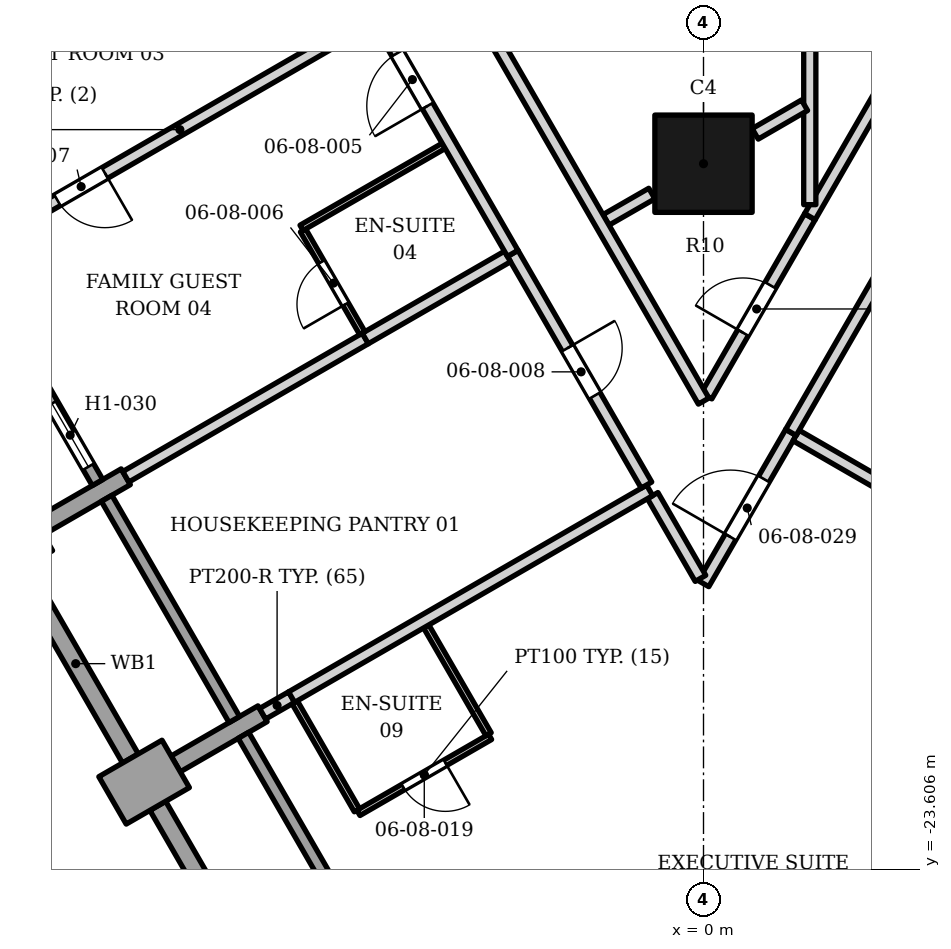
"""IFC4 building model, lengths in metres.
Left out: names, types, materials, properties, quantities, classifications, styles, units other than length and angle.
Written with IfcOpenShell. Run it as: python <this file> out.ifc"""

import sys

from ifc_helpers import new_model, si_unit, direction, frame, frame_2d, origin, origin_2d, place, context, subcontext, project, spatial, rectangle, extrude, element, fill, save


model = new_model("IFC4")
c1 = context("Model", 3, precision=1e-05, world=origin(), true_north=direction((0.0, 1.0)))
c2 = subcontext(c1, "Body", "Model", "MODEL_VIEW")
j1 = project(units=[si_unit("LENGTHUNIT", "METRE"), si_unit("PLANEANGLEUNIT", "RADIAN")], contexts=[c1])
p1 = place(None, origin())
s1 = spatial("IfcSite", under=j1, at=p1, CompositionType="ELEMENT")
p2 = place(p1, origin())
s2 = spatial("IfcBuilding", under=s1, at=p2, CompositionType="ELEMENT")
p3 = place(p2, frame((0.0, 0.0, 46.0)))
s3 = spatial("IfcBuildingStorey", under=s2, at=p3, CompositionType="ELEMENT", Elevation=46.0)
p4 = place(p3, frame((0.0, -12.0, 0.0), z_axis=(0.0, 0.0, 1.0), x_axis=(1.0, 0.0, 0.0)))
e1 = element("IfcColumn", 1, at=p4, inside=s3, PredefinedType="COLUMN", context=c2, shape_type="SweptSolid", body=[
    extrude(rectangle(XDim=1.6, YDim=1.6, at=origin_2d()), origin(), (0.0, 0.0, 1.0), 3.4),
])
p5 = place(p3, frame((-11.45, -18.273, 0.0), z_axis=(0.0, 0.0, 1.0), x_axis=(0.5, -0.866025403784, 0.0)))
e2 = element("IfcColumn", 2, at=p5, inside=s3, PredefinedType="COLUMN", context=c2, shape_type="SweptSolid", body=[
    extrude(rectangle(XDim=0.9, YDim=1.2, at=origin_2d()), origin(), (0.0, 0.0, 1.0), 3.4),
])
p6 = place(p3, frame((-10.93, -17.973, 0.0), z_axis=(0.0, 0.0, 1.0), x_axis=(0.866040211805, 0.499974350878, 0.0)))
e3 = element("IfcWall", 3, at=p6, inside=s3, PredefinedType="SOLIDWALL", context=c2, shape_type="SweptSolid", body=[
    extrude(rectangle(XDim=1.65, YDim=0.3, at=frame_2d((0.825, 0.0))), origin(), (0.0, 0.0, 1.0), 2.65),
])
p7 = place(p3, frame((-8.68, -21.87, 0.0), z_axis=(0.0, 0.0, 1.0), x_axis=(-0.866094119867, -0.499880961361, 0.0)))
e4 = element("IfcWall", 4, at=p7, inside=s3, PredefinedType="SOLIDWALL", context=c2, shape_type="SweptSolid", body=[
    extrude(rectangle(XDim=1.2, YDim=0.9, at=frame_2d((0.6, 0.0))), origin(), (0.0, 0.0, 1.0), 2.63),
])
p8 = place(p3, frame((-8.68, -21.87, 0.0), z_axis=(0.0, 0.0, 1.0), x_axis=(0.865976140824, 0.500085316245, 0.0)))
e5 = element("IfcWall", 5, at=p8, inside=s3, PredefinedType="SOLIDWALL", context=c2, shape_type="SweptSolid", body=[
    extrude(rectangle(XDim=1.65, YDim=0.3, at=frame_2d((0.825, 0.0))), origin(), (0.0, 0.0, 1.0), 2.65),
])
p9 = place(p3, frame((-12.066, -13.606, 0.0), z_axis=(0.0, 0.0, 1.0), x_axis=(0.500027713859, -0.866009402589, 0.0)))
e6 = element("IfcWall", 6, at=p9, inside=s3, PredefinedType="ELEMENTEDWALL", context=c2, shape_type="SweptSolid", body=[
    extrude(rectangle(XDim=4.2, YDim=0.2, at=frame_2d((2.1, 0.0))), origin(), (0.0, 0.0, 1.0), 2.65),
])
p10 = place(p9, frame((0.3, 0.0, 0.6)))
e7 = element("IfcOpeningElement", 7, at=p10, cuts=e6, PredefinedType="OPENING", context=c2, shape_type="SweptSolid", body=[
    extrude(rectangle(XDim=2.1, YDim=1.8, at=frame_2d((1.05, 0.9))), frame((0.0, 0.11, 0.0), z_axis=(0.0, -1.0, 0.0), x_axis=(1.0, 0.0, 0.0)), (0.0, 0.0, 1.0), 0.22),
])
p11 = place(p9, frame((2.7, 0.0, 0.0)))
e8 = element("IfcOpeningElement", 8, at=p11, cuts=e6, PredefinedType="OPENING", context=c2, shape_type="SweptSolid", body=[
    extrude(rectangle(XDim=1.2, YDim=2.4, at=frame_2d((0.6, 1.2))), frame((0.0, 0.11, 0.0), z_axis=(0.0, -1.0, 0.0), x_axis=(1.0, 0.0, 0.0)), (0.0, 0.0, 1.0), 0.22),
])
p12 = place(p3, frame((-11.225, -18.663, 0.0), z_axis=(0.0, 0.0, 1.0), x_axis=(0.500012057535, -0.866018442252, 0.0)))
e9 = element("IfcWall", 9, at=p12, inside=s3, PredefinedType="SOLIDWALL", context=c2, shape_type="SweptSolid", body=[
    extrude(rectangle(XDim=3.6, YDim=0.3, at=frame_2d((1.8, 0.0))), origin(), (0.0, 0.0, 1.0), 2.63),
])
p13 = place(p3, frame((-9.816, -17.503, 0.0), z_axis=(0.0, 0.0, 1.0), x_axis=(0.500002543286, -0.866023935413, 0.0)))
e10 = element("IfcWall", 10, at=p13, inside=s3, PredefinedType="ELEMENTEDWALL", context=c2, shape_type="SweptSolid", body=[
    extrude(rectangle(XDim=4.2, YDim=0.2, at=frame_2d((2.1, 0.0))), origin(), (0.0, 0.0, 1.0), 2.65),
])
p14 = place(p3, frame((-8.975, -22.56, 0.0), z_axis=(0.0, 0.0, 1.0), x_axis=(0.500012057535, -0.866018442252, 0.0)))
e11 = element("IfcWall", 11, at=p14, inside=s3, PredefinedType="SOLIDWALL", context=c2, shape_type="SweptSolid", body=[
    extrude(rectangle(XDim=3.6, YDim=0.3, at=frame_2d((1.8, 0.0))), origin(), (0.0, 0.0, 1.0), 2.63),
])
p15 = place(p3, frame((-7.566, -21.4, 0.0), z_axis=(0.0, 0.0, 1.0), x_axis=(0.500027713859, -0.866009402589, 0.0)))
e12 = element("IfcWall", 12, at=p15, inside=s3, PredefinedType="ELEMENTEDWALL", context=c2, shape_type="SweptSolid", body=[
    extrude(rectangle(XDim=4.2, YDim=0.2, at=frame_2d((2.1, 0.0))), origin(), (0.0, 0.0, 1.0), 2.65),
])
p16 = place(p3, frame((-5.675, -22.676, 0.0), z_axis=(0.0, 0.0, 1.0), x_axis=(0.866022959057, 0.500004234368, 0.0)))
e13 = element("IfcWall", 13, at=p16, inside=s3, PredefinedType="PARTITIONING", context=c2, shape_type="SweptSolid", body=[
    extrude(rectangle(XDim=2.5, YDim=0.1, at=frame_2d((1.25, 0.0))), origin(), (0.0, 0.0, 1.0), 2.552),
])
p17 = place(p16, frame((0.85, 0.0, 0.0)))
e14 = element("IfcOpeningElement", 14, at=p17, cuts=e13, PredefinedType="OPENING", context=c2, shape_type="SweptSolid", body=[
    extrude(rectangle(XDim=0.8, YDim=2.1, at=frame_2d((0.4, 1.05))), frame((0.0, 0.06, 0.0), z_axis=(0.0, -1.0, 0.0), x_axis=(1.0, 0.0, 0.0)), (0.0, 0.0, 1.0), 0.12),
])
p18 = place(p3, frame((-4.561, -19.608, 0.0), z_axis=(0.0, 0.0, 1.0), x_axis=(0.500646589026, -0.865651773461, 0.0)))
e15 = element("IfcWall", 15, at=p18, inside=s3, PredefinedType="PARTITIONING", context=c2, shape_type="SweptSolid", body=[
    extrude(rectangle(XDim=2.05, YDim=0.1, at=frame_2d((1.025, 0.0))), origin(), (0.0, 0.0, 1.0), 2.552),
])
p19 = place(p3, frame((-7.251, -21.046, 0.0), z_axis=(0.0, 0.0, 1.0), x_axis=(0.86747675874, 0.497477711105, 0.0)))
e16 = element("IfcWall", 16, at=p19, inside=s3, PredefinedType="PARTITIONING", context=c2, shape_type="SweptSolid", body=[
    extrude(rectangle(XDim=0.55, YDim=0.2, at=frame_2d((0.275, 0.0))), origin(), (0.0, 0.0, 1.0), 3.23),
])
p20 = place(p3, frame((-6.723, -20.856, 0.0), z_axis=(0.0, 0.0, 1.0), x_axis=(0.499354689006, -0.866397653833, 0.0)))
e17 = element("IfcWall", 17, at=p20, inside=s3, PredefinedType="PARTITIONING", context=c2, shape_type="SweptSolid", body=[
    extrude(rectangle(XDim=2.05, YDim=0.1, at=frame_2d((1.025, 0.0))), origin(), (0.0, 0.0, 1.0), 3.23),
])
p21 = place(p3, frame((0.0, -18.906, 0.0), z_axis=(0.0, 0.0, 1.0), x_axis=(0.50046312627, 0.865757852545, 0.0)))
e18 = element("IfcWall", 18, at=p21, inside=s3, PredefinedType="PARTITIONING", context=c2, shape_type="SweptSolid", body=[
    extrude(rectangle(XDim=2.872, YDim=0.2, at=frame_2d((1.436, 0.0))), origin(), (0.0, 0.0, 1.0), 2.628),
])
p22 = place(p21, frame((0.886, 0.0, 0.0)))
e19 = element("IfcOpeningElement", 19, at=p22, cuts=e18, PredefinedType="OPENING", context=c2, shape_type="SweptSolid", body=[
    extrude(rectangle(XDim=1.1, YDim=2.1, at=frame_2d((0.55, 1.05))), frame((0.0, 0.11, 0.0), z_axis=(0.0, -1.0, 0.0), x_axis=(1.0, 0.0, 0.0)), (0.0, 0.0, 1.0), 0.22),
])
p23 = place(p3, frame((-0.836, -17.458, 0.0), z_axis=(0.0, 0.0, 1.0), x_axis=(0.50013013712, -0.865950256045, 0.0)))
e20 = element("IfcWall", 20, at=p23, inside=s3, PredefinedType="PARTITIONING", context=c2, shape_type="SweptSolid", body=[
    extrude(rectangle(XDim=1.572, YDim=0.2, at=frame_2d((0.786, 0.0))), origin(), (0.0, 0.0, 1.0), 2.628),
])
p24 = place(p3, frame((-6.774, -20.772, 0.0), z_axis=(0.0, 0.0, 1.0), x_axis=(0.866036107898, 0.499981459473, 0.0)))
e21 = element("IfcWall", 21, at=p24, inside=s3, PredefinedType="PARTITIONING", context=c2, shape_type="SweptSolid", body=[
    extrude(rectangle(XDim=6.8, YDim=0.2, at=frame_2d((3.4, 0.0))), origin(), (0.0, 0.0, 1.0), 2.552),
])
p25 = place(p3, frame((-3.137, -13.476, 0.0), z_axis=(0.0, 0.0, 1.0), x_axis=(0.499989943423, -0.866031209874, 0.0)))
e22 = element("IfcWall", 22, at=p25, inside=s3, PredefinedType="PARTITIONING", context=c2, shape_type="SweptSolid", body=[
    extrude(rectangle(XDim=4.398, YDim=0.2, at=frame_2d((2.199, 0.0))), origin(), (0.0, 0.0, 1.0), 3.23),
])
p26 = place(p25, frame((1.798, 0.0, 0.0)))
e23 = element("IfcOpeningElement", 23, at=p26, cuts=e22, PredefinedType="OPENING", context=c2, shape_type="SweptSolid", body=[
    extrude(rectangle(XDim=0.9, YDim=2.1, at=frame_2d((0.45, 1.05))), frame((0.0, 0.11, 0.0), z_axis=(0.0, -1.0, 0.0), x_axis=(1.0, 0.0, 0.0)), (0.0, 0.0, 1.0), 0.22),
])
p27 = place(p3, frame((1.522, -16.469, 0.0), z_axis=(0.0, 0.0, 1.0), x_axis=(0.866125590059, -0.499826432119, 0.0)))
e24 = element("IfcWall", 24, at=p27, inside=s3, PredefinedType="PARTITIONING", context=c2, shape_type="SweptSolid", body=[
    extrude(rectangle(XDim=7.25, YDim=0.2, at=frame_2d((3.625, 0.0))), origin(), (0.0, 0.0, 1.0), 2.552),
])
p28 = place(p3, frame((0.05, -15.818, 0.0), z_axis=(0.0, 0.0, 1.0), x_axis=(0.499521489101, 0.866301495974, 0.0)))
e25 = element("IfcWall", 25, at=p28, inside=s3, PredefinedType="PARTITIONING", context=c2, shape_type="SweptSolid", body=[
    extrude(rectangle(XDim=3.401, YDim=0.2, at=frame_2d((1.7, 0.0))), origin(), (0.0, 0.0, 1.0), 2.628),
])
p29 = place(p28, frame((1.2, 0.0, 0.0)))
e26 = element("IfcOpeningElement", 26, at=p29, cuts=e25, PredefinedType="OPENING", context=c2, shape_type="SweptSolid", body=[
    extrude(rectangle(XDim=0.9, YDim=2.1, at=frame_2d((0.45, 1.05))), frame((0.0, 0.11, 0.0), z_axis=(0.0, -1.0, 0.0), x_axis=(1.0, 0.0, 0.0)), (0.0, 0.0, 1.0), 0.22),
])
p30 = place(p3, frame((-9.501, -17.148, 0.0), z_axis=(0.0, 0.0, 1.0), x_axis=(0.866032838626, 0.499987122256, 0.0)))
e27 = element("IfcWall", 27, at=p30, inside=s3, PredefinedType="PARTITIONING", context=c2, shape_type="SweptSolid", body=[
    extrude(rectangle(XDim=4.551, YDim=0.2, at=frame_2d((2.276, 0.0))), origin(), (0.0, 0.0, 1.0), 2.782),
])
p31 = place(p3, frame((-5.563, -14.874, 0.0), z_axis=(0.0, 0.0, 1.0), x_axis=(0.866384216157, 0.499378003114, 0.0)))
e28 = element("IfcWall", 28, at=p31, inside=s3, PredefinedType="PARTITIONING", context=c2, shape_type="SweptSolid", body=[
    extrude(rectangle(XDim=2.7, YDim=0.2, at=frame_2d((1.35, 0.0))), origin(), (0.0, 0.0, 1.0), 2.552),
])
p32 = place(p3, frame((-6.586, -13.098, 0.0), z_axis=(0.0, 0.0, 1.0), x_axis=(0.49995005938, -0.866054235095, 0.0)))
e29 = element("IfcWall", 29, at=p32, inside=s3, PredefinedType="PARTITIONING", context=c2, shape_type="SweptSolid", body=[
    extrude(rectangle(XDim=1.95, YDim=0.1, at=frame_2d((0.975, 0.0))), origin(), (0.0, 0.0, 1.0), 3.23),
])
p33 = place(p32, frame((0.6, 0.0, 0.0)))
e30 = element("IfcOpeningElement", 30, at=p33, cuts=e29, PredefinedType="OPENING", context=c2, shape_type="SweptSolid", body=[
    extrude(rectangle(XDim=0.8, YDim=2.1, at=frame_2d((0.4, 1.05))), frame((0.0, 0.06, 0.0), z_axis=(0.0, -1.0, 0.0), x_axis=(1.0, 0.0, 0.0)), (0.0, 0.0, 1.0), 0.12),
])
p34 = place(p3, frame((-1.604, -12.924, 0.0), z_axis=(0.0, 0.0, 1.0), x_axis=(0.866960927484, 0.498376113207, 0.0)))
e31 = element("IfcWall", 31, at=p34, inside=s3, PredefinedType="PARTITIONING", context=c2, shape_type="SweptSolid", body=[
    extrude(rectangle(XDim=0.869, YDim=0.2, at=frame_2d((0.435, 0.0))), origin(), (0.0, 0.0, 1.0), 3.23),
])
p35 = place(p3, frame((1.75, -12.87, 0.0), z_axis=(0.0, 0.0, 1.0), x_axis=(0.499999309361, 0.866025802525, 0.0)))
e32 = element("IfcWall", 32, at=p35, inside=s3, PredefinedType="PARTITIONING", context=c2, shape_type="SweptSolid", body=[
    extrude(rectangle(XDim=19.134, YDim=0.2, at=frame_2d((9.567, 0.0))), origin(), (0.0, 0.0, 1.0), 2.302),
])
p36 = place(p35, frame((14.098, 0.0, 0.0)))
e33 = element("IfcOpeningElement", 33, at=p36, cuts=e32, PredefinedType="OPENING", context=c2, shape_type="SweptSolid", body=[
    extrude(rectangle(XDim=1.0, YDim=2.1, at=frame_2d((0.5, 1.05))), frame((0.0, 0.11, 0.0), z_axis=(0.0, -1.0, 0.0), x_axis=(1.0, 0.0, 0.0)), (0.0, 0.0, 1.0), 0.22),
])
p37 = place(p35, frame((4.53, 0.0, 0.0)))
e34 = element("IfcOpeningElement", 34, at=p37, cuts=e32, PredefinedType="OPENING", context=c2, shape_type="SweptSolid", body=[
    extrude(rectangle(XDim=1.0, YDim=2.1, at=frame_2d((0.5, 1.05))), frame((0.0, 0.11, 0.0), z_axis=(0.0, -1.0, 0.0), x_axis=(1.0, 0.0, 0.0)), (0.0, 0.0, 1.0), 0.22),
])
p38 = place(p3, frame((1.748, -12.674, 0.0), z_axis=(0.0, 0.0, 1.0), x_axis=(0.0, 1.0, 0.0)))
e35 = element("IfcWall", 35, at=p38, inside=s3, PredefinedType="PARTITIONING", context=c2, shape_type="SweptSolid", body=[
    extrude(rectangle(XDim=8.516, YDim=0.2, at=frame_2d((4.258, 0.0))), origin(), (0.0, 0.0, 1.0), 2.302),
])
p39 = place(p3, frame((-6.611, -13.054, 0.0), z_axis=(0.0, 0.0, 1.0), x_axis=(0.866339109022, 0.499456252518, 0.0)))
e36 = element("IfcWall", 36, at=p39, inside=s3, PredefinedType="PARTITIONING", context=c2, shape_type="SweptSolid", body=[
    extrude(rectangle(XDim=2.7, YDim=0.1, at=frame_2d((1.35, 0.0))), origin(), (0.0, 0.0, 1.0), 2.302),
])
p40 = place(p3, frame((0.85, -11.509, 0.0), z_axis=(0.0, 0.0, 1.0), x_axis=(0.865248014814, 0.501344066345, 0.0)))
e37 = element("IfcWall", 37, at=p40, inside=s3, PredefinedType="PARTITIONING", context=c2, shape_type="SweptSolid", body=[
    extrude(rectangle(XDim=0.938, YDim=0.2, at=frame_2d((0.469, 0.0))), origin(), (0.0, 0.0, 1.0), 3.23),
])
p41 = place(p3, frame((-11.751, -13.251, 0.0), z_axis=(0.0, 0.0, 1.0), x_axis=(0.866134002969, 0.499811853502, 0.0)))
e38 = element("IfcWall", 38, at=p41, inside=s3, PredefinedType="PARTITIONING", context=c2, shape_type="SweptSolid", body=[
    extrude(rectangle(XDim=7.25, YDim=0.2, at=frame_2d((3.625, 0.0))), origin(), (0.0, 0.0, 1.0), 2.302),
])
p42 = place(p41, frame((1.3, 0.0, 0.0)))
e39 = element("IfcOpeningElement", 39, at=p42, cuts=e38, PredefinedType="OPENING", context=c2, shape_type="SweptSolid", body=[
    extrude(rectangle(XDim=0.9, YDim=2.1, at=frame_2d((0.45, 1.05))), frame((0.0, 0.11, 0.0), z_axis=(0.0, -1.0, 0.0), x_axis=(1.0, 0.0, 0.0)), (0.0, 0.0, 1.0), 0.22),
])
p43 = place(p3, frame((-6.783, -4.156, 0.0), z_axis=(0.0, 0.0, 1.0), x_axis=(0.500162761554, -0.865931412962, 0.0)))
e40 = element("IfcWall", 40, at=p43, inside=s3, PredefinedType="PARTITIONING", context=c2, shape_type="SweptSolid", body=[
    extrude(rectangle(XDim=13.566, YDim=0.2, at=frame_2d((6.783, 0.0))), origin(), (0.0, 0.0, 1.0), 2.302),
])
p44 = place(p43, frame((4.642, 0.0, 0.0)))
e41 = element("IfcOpeningElement", 41, at=p44, cuts=e40, PredefinedType="OPENING", context=c2, shape_type="SweptSolid", body=[
    extrude(rectangle(XDim=0.9, YDim=2.1, at=frame_2d((0.45, 1.05))), frame((0.0, 0.11, 0.0), z_axis=(0.0, -1.0, 0.0), x_axis=(1.0, 0.0, 0.0)), (0.0, 0.0, 1.0), 0.22),
])
p45 = place(p3, frame((-9.937, -1.698, 0.0), z_axis=(0.0, 0.0, 1.0), x_axis=(0.500001173101, -0.866024726493, 0.0)))
e42 = element("IfcWall", 42, at=p45, inside=s3, PredefinedType="PARTITIONING", context=c2, shape_type="SweptSolid", body=[
    extrude(rectangle(XDim=13.598, YDim=0.2, at=frame_2d((6.799, 0.0))), origin(), (0.0, 0.0, 1.0), 2.302),
])
p46 = place(p45, frame((0.598, 0.0, 0.0)))
e43 = element("IfcOpeningElement", 43, at=p46, cuts=e42, PredefinedType="OPENING", context=c2, shape_type="SweptSolid", body=[
    extrude(rectangle(XDim=1.1, YDim=2.1, at=frame_2d((0.55, 1.05))), frame((0.0, 0.11, 0.0), z_axis=(0.0, -1.0, 0.0), x_axis=(1.0, 0.0, 0.0)), (0.0, 0.0, 1.0), 0.22),
])
p47 = place(p45, frame((7.398, 0.0, 0.0)))
e44 = element("IfcOpeningElement", 44, at=p47, cuts=e42, PredefinedType="OPENING", context=c2, shape_type="SweptSolid", body=[
    extrude(rectangle(XDim=1.0, YDim=2.1, at=frame_2d((0.5, 1.05))), frame((0.0, 0.11, 0.0), z_axis=(0.0, -1.0, 0.0), x_axis=(1.0, 0.0, 0.0)), (0.0, 0.0, 1.0), 0.22),
])
p48 = place(p45, frame((9.798, 0.0, 0.0)))
e45 = element("IfcOpeningElement", 45, at=p48, cuts=e42, PredefinedType="OPENING", context=c2, shape_type="SweptSolid", body=[
    extrude(rectangle(XDim=1.0, YDim=2.1, at=frame_2d((0.5, 1.05))), frame((0.0, 0.11, 0.0), z_axis=(0.0, -1.0, 0.0), x_axis=(1.0, 0.0, 0.0)), (0.0, 0.0, 1.0), 0.22),
])
p49 = place(p3, frame((1.438, -16.419, 0.0), z_axis=(0.0, 0.0, 1.0), x_axis=(0.499996012009, 0.86602770624, 0.0)))
e46 = element("IfcWall", 46, at=p49, inside=s3, PredefinedType="PARTITIONING", context=c2, shape_type="SweptSolid", body=[
    extrude(rectangle(XDim=18.0, YDim=0.2, at=frame_2d((9.0, 0.0))), origin(), (0.0, 0.0, 1.0), 2.302),
])
p50 = place(p49, frame((4.0, 0.0, 0.0)))
e47 = element("IfcOpeningElement", 47, at=p50, cuts=e46, PredefinedType="OPENING", context=c2, shape_type="SweptSolid", body=[
    extrude(rectangle(XDim=1.0, YDim=2.1, at=frame_2d((0.5, 1.05))), frame((0.0, 0.11, 0.0), z_axis=(0.0, -1.0, 0.0), x_axis=(1.0, 0.0, 0.0)), (0.0, 0.0, 1.0), 0.22),
])
p51 = place(p49, frame((9.8, 0.0, 0.0)))
e48 = element("IfcOpeningElement", 48, at=p51, cuts=e46, PredefinedType="OPENING", context=c2, shape_type="SweptSolid", body=[
    extrude(rectangle(XDim=1.1, YDim=2.1, at=frame_2d((0.55, 1.05))), frame((0.0, 0.11, 0.0), z_axis=(0.0, -1.0, 0.0), x_axis=(1.0, 0.0, 0.0)), (0.0, 0.0, 1.0), 0.22),
])
p52 = place(p11, origin())
e49 = element("IfcDoor", 49, at=p52, inside=s3, OperationType="SINGLE_SWING_LEFT", PredefinedType="DOOR", context=c2, shape_type="SweptSolid", body=[
    extrude(rectangle(XDim=1.2, YDim=2.4, at=frame_2d((0.6, 1.2))), frame((0.0, 0.025, 0.0), z_axis=(0.0, -1.0, 0.0), x_axis=(1.0, 0.0, 0.0)), (0.0, 0.0, 1.0), 0.05),
])
fill(e8, e49)
p53 = place(p48, origin())
e50 = element("IfcDoor", 50, at=p53, inside=s3, OperationType="SINGLE_SWING_RIGHT", PredefinedType="DOOR", context=c2, shape_type="SweptSolid", body=[
    extrude(rectangle(XDim=1.0, YDim=2.1, at=frame_2d((0.5, 1.05))), frame((0.0, 0.025, 0.0), z_axis=(0.0, -1.0, 0.0), x_axis=(1.0, 0.0, 0.0)), (0.0, 0.0, 1.0), 0.05),
])
fill(e45, e50)
p54 = place(p33, origin())
e51 = element("IfcDoor", 51, at=p54, inside=s3, OperationType="SINGLE_SWING_RIGHT", PredefinedType="DOOR", context=c2, shape_type="SweptSolid", body=[
    extrude(rectangle(XDim=0.8, YDim=2.1, at=frame_2d((0.4, 1.05))), frame((0.0, 0.025, 0.0), z_axis=(0.0, -1.0, 0.0), x_axis=(1.0, 0.0, 0.0)), (0.0, 0.0, 1.0), 0.05),
])
fill(e30, e51)
p55 = place(p42, origin())
e52 = element("IfcDoor", 52, at=p55, inside=s3, OperationType="SINGLE_SWING_RIGHT", PredefinedType="DOOR", context=c2, shape_type="SweptSolid", body=[
    extrude(rectangle(XDim=0.9, YDim=2.1, at=frame_2d((0.45, 1.05))), frame((0.0, 0.025, 0.0), z_axis=(0.0, -1.0, 0.0), x_axis=(1.0, 0.0, 0.0)), (0.0, 0.0, 1.0), 0.05),
])
fill(e39, e52)
p56 = place(p26, origin())
e53 = element("IfcDoor", 53, at=p56, inside=s3, OperationType="SINGLE_SWING_LEFT", PredefinedType="DOOR", context=c2, shape_type="SweptSolid", body=[
    extrude(rectangle(XDim=0.9, YDim=2.1, at=frame_2d((0.45, 1.05))), frame((0.0, 0.025, 0.0), z_axis=(0.0, -1.0, 0.0), x_axis=(1.0, 0.0, 0.0)), (0.0, 0.0, 1.0), 0.05),
])
fill(e23, e53)
p57 = place(p29, origin())
e54 = element("IfcDoor", 54, at=p57, inside=s3, OperationType="SINGLE_SWING_LEFT", PredefinedType="DOOR", context=c2, shape_type="SweptSolid", body=[
    extrude(rectangle(XDim=0.9, YDim=2.1, at=frame_2d((0.45, 1.05))), frame((0.0, 0.025, 0.0), z_axis=(0.0, -1.0, 0.0), x_axis=(1.0, 0.0, 0.0)), (0.0, 0.0, 1.0), 0.05),
])
fill(e26, e54)
p58 = place(p17, origin())
e55 = element("IfcDoor", 55, at=p58, inside=s3, OperationType="SINGLE_SWING_RIGHT", PredefinedType="DOOR", context=c2, shape_type="SweptSolid", body=[
    extrude(rectangle(XDim=0.8, YDim=2.1, at=frame_2d((0.4, 1.05))), frame((0.0, 0.025, 0.0), z_axis=(0.0, -1.0, 0.0), x_axis=(1.0, 0.0, 0.0)), (0.0, 0.0, 1.0), 0.05),
])
fill(e14, e55)
p59 = place(p22, origin())
e56 = element("IfcDoor", 56, at=p59, inside=s3, OperationType="SINGLE_SWING_LEFT", PredefinedType="DOOR", context=c2, shape_type="SweptSolid", body=[
    extrude(rectangle(XDim=1.1, YDim=2.1, at=frame_2d((0.55, 1.05))), frame((0.0, 0.025, 0.0), z_axis=(0.0, -1.0, 0.0), x_axis=(1.0, 0.0, 0.0)), (0.0, 0.0, 1.0), 0.05),
])
fill(e19, e56)
save(model, sys.argv[1])
